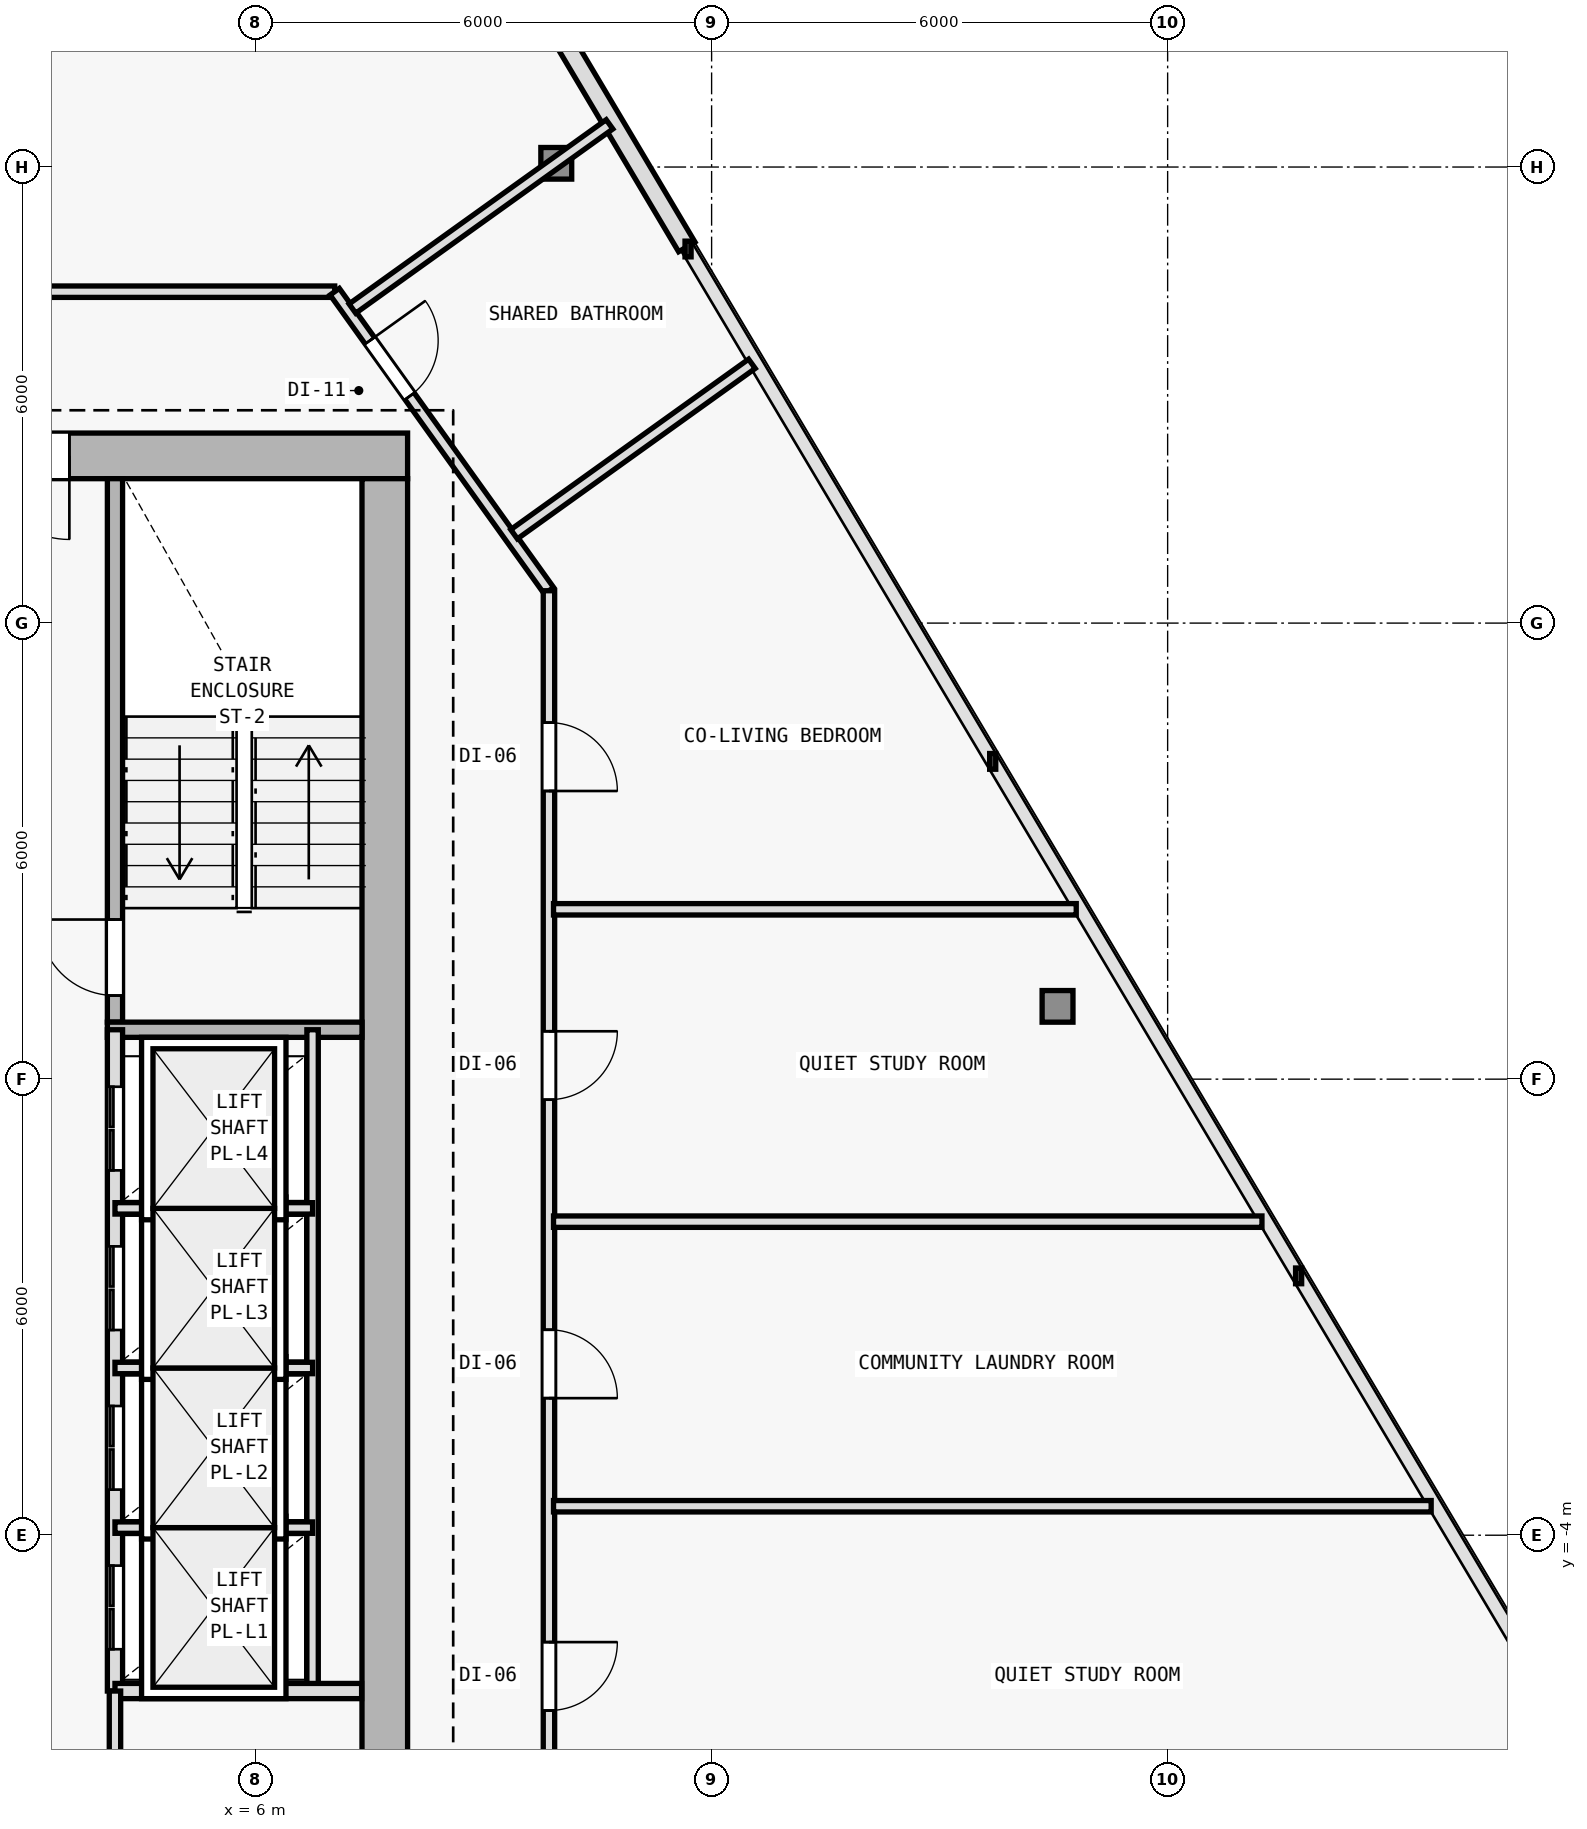
"""IFC4 building model, lengths in metres.
Left out: names, types, materials, properties, quantities, classifications, styles, units other than length and angle.
Written with IfcOpenShell. Run it as: python <this file> out.ifc"""

import sys

from ifc_helpers import new_model, si_unit, direction, frame, frame_2d, origin, origin_2d, place, context, subcontext, project, spatial, rectangle, i_section, extrude, element, fill, save


model = new_model("IFC4")
c1 = context("Model", 3, precision=1e-05, world=origin(), true_north=direction((0.0, 1.0)))
c2 = subcontext(c1, "Body", "Model", "MODEL_VIEW")
j1 = project(units=[si_unit("LENGTHUNIT", "METRE"), si_unit("PLANEANGLEUNIT", "RADIAN")], contexts=[c1])
p1 = place(None, origin())
s1 = spatial("IfcSite", under=j1, at=p1, CompositionType="ELEMENT")
p2 = place(p1, origin())
s2 = spatial("IfcBuilding", under=s1, at=p2, CompositionType="ELEMENT")
p3 = place(p2, frame((0.0, 0.0, 107.7)))
s3 = spatial("IfcBuildingStorey", under=s2, at=p3, CompositionType="ELEMENT", Elevation=107.7)
for number, where, z_axis, x_axis in (
    (1, (7.7, 10.2, 0.0), (0.0, 0.0, 1.0), (1.0, 0.0, 0.0)),
    (2, (7.7, 0.4, 0.0), (0.0, 0.0, 1.0), (1.0, 0.0, 0.0)),
):
    element("IfcColumn", number, at=place(p3, frame(where, z_axis=z_axis, x_axis=x_axis)), inside=s3, PredefinedType="COLUMN", context=c2, shape_type="SweptSolid", body=[
        extrude(i_section(OverallWidth=0.409, OverallDepth=0.425, WebThickness=0.021, FlangeThickness=0.034, FilletRadius=0.015, at=origin_2d()), origin(), (0.0, 0.0, 1.0), 3.6),
    ])
p4 = place(p3, frame((16.552, 2.958, 0.006), z_axis=(-0.019451168192, 0.009793595174, 0.999762840652), x_axis=(-0.449710241045, -0.893174506521, 0.0)))
e3 = element("IfcColumn", 3, at=p4, inside=s3, PredefinedType="COLUMN", context=c2, shape_type="SweptSolid", body=[
    extrude(i_section(OverallWidth=0.406, OverallDepth=0.416, WebThickness=0.019, FlangeThickness=0.031, FilletRadius=0.015, at=origin_2d()), origin(), (0.0, 0.0, 1.0), 3.59),
])
p5 = place(p3, frame((9.956, 14.049, 0.006), z_axis=(-0.012039903353, -0.002584838008, 0.999924176795), x_axis=(0.209906311695, -0.977721504474, 0.0)))
e4 = element("IfcColumn", 4, at=p5, inside=s3, PredefinedType="COLUMN", context=c2, shape_type="SweptSolid", body=[
    extrude(i_section(OverallWidth=0.406, OverallDepth=0.416, WebThickness=0.019, FlangeThickness=0.031, FilletRadius=0.015, at=origin_2d()), origin(), (0.0, 0.0, 1.0), 3.589),
])
p6 = place(p3, frame((6.017, 22.462, 0.0), z_axis=(0.0, 0.0, 1.0), x_axis=(0.511085523564, -0.859529864288, 0.0)))
e5 = element("IfcWall", 5, at=p6, inside=s3, PredefinedType="SOLIDWALL", context=c2, shape_type="SweptSolid", body=[
    extrude(rectangle(XDim=11.068, YDim=0.25, at=frame_2d((5.534, 0.0))), origin(), (0.0, 0.0, 1.0), 3.35),
])
p7 = place(p6, frame((4.934, 0.0, 0.62)))
e6 = element("IfcOpeningElement", 6, at=p7, cuts=e5, PredefinedType="OPENING", context=c2, shape_type="SweptSolid", body=[
    extrude(rectangle(XDim=1.2, YDim=1.8, at=frame_2d((0.6, 0.9))), frame((0.0, 0.135, 0.0), z_axis=(0.0, -1.0, 0.0), x_axis=(1.0, 0.0, 0.0)), (0.0, 0.0, 1.0), 0.27),
])
p8 = place(p3, frame((8.0, 10.2, 0.0), z_axis=(0.0, 0.0, 1.0), x_axis=(-1.0, 0.0, 0.0)))
e7 = element("IfcWall", 7, at=p8, inside=s3, PredefinedType="SHEAR", context=c2, shape_type="SweptSolid", body=[
    extrude(rectangle(XDim=16.0, YDim=0.6, at=frame_2d((8.0, 0.0))), origin(), (0.0, 0.0, 1.0), 3.35),
])
p9 = place(p8, frame((4.45, 0.0, 0.0)))
e8 = element("IfcOpeningElement", 8, at=p9, cuts=e7, PredefinedType="OPENING", context=c2, shape_type="SweptSolid", body=[
    extrude(rectangle(XDim=1.1, YDim=2.15, at=frame_2d((0.55, 1.075))), frame((0.0, 0.31, 0.0), z_axis=(0.0, -1.0, 0.0), x_axis=(1.0, 0.0, 0.0)), (0.0, 0.0, 1.0), 0.62),
])
p10 = place(p3, frame((7.7, 9.9, 0.0), z_axis=(0.0, 0.0, 1.0), x_axis=(0.0, -1.0, 0.0)))
e9 = element("IfcWall", 9, at=p10, inside=s3, PredefinedType="SHEAR", context=c2, shape_type="SweptSolid", body=[
    extrude(rectangle(XDim=19.0, YDim=0.6, at=frame_2d((9.5, 0.0))), origin(), (0.0, 0.0, 1.0), 3.35),
])
p11 = place(p3, frame((4.15, 2.75, 0.0), z_axis=(0.0, 0.0, 1.0), x_axis=(0.0, 1.0, 0.0)))
e10 = element("IfcWall", 10, at=p11, inside=s3, PredefinedType="SOLIDWALL", context=c2, shape_type="SweptSolid", body=[
    extrude(rectangle(XDim=7.15, YDim=0.2, at=frame_2d((3.575, 0.0))), origin(), (0.0, 0.0, 1.0), 3.35),
])
p12 = place(p11, frame((0.35, 0.0, 0.0)))
e11 = element("IfcOpeningElement", 11, at=p12, cuts=e10, PredefinedType="OPENING", context=c2, shape_type="SweptSolid", body=[
    extrude(rectangle(XDim=1.0, YDim=2.15, at=frame_2d((0.5, 1.075))), frame((0.0, 0.11, 0.0), z_axis=(0.0, -1.0, 0.0), x_axis=(1.0, 0.0, 0.0)), (0.0, 0.0, 1.0), 0.22),
])
p13 = place(p3, frame((4.05, 2.65, 0.0), z_axis=(0.0, 0.0, 1.0), x_axis=(1.0, 0.0, 0.0)))
e12 = element("IfcWall", 12, at=p13, inside=s3, PredefinedType="SOLIDWALL", context=c2, shape_type="SweptSolid", body=[
    extrude(rectangle(XDim=3.35, YDim=0.2, at=frame_2d((1.675, 0.0))), origin(), (0.0, 0.0, 1.0), 3.35),
])
p14 = place(p3, frame((4.15, -6.05, 0.0), z_axis=(0.0, 0.0, 1.0), x_axis=(0.0, 1.0, 0.0)))
e13 = element("IfcWall", 13, at=p14, inside=s3, PredefinedType="SOLIDWALL", context=c2, shape_type="SweptSolid", body=[
    extrude(rectangle(XDim=8.7, YDim=0.2, at=frame_2d((4.35, 0.0))), origin(), (0.0, 0.0, 1.0), 3.35),
])
p15 = place(p14, frame((0.55, 0.0, 0.0)))
e14 = element("IfcOpeningElement", 14, at=p15, cuts=e13, PredefinedType="OPENING", context=c2, shape_type="SweptSolid", body=[
    extrude(rectangle(XDim=1.1, YDim=2.15, at=frame_2d((0.55, 1.075))), frame((0.0, 0.11, 0.0), z_axis=(0.0, -1.0, 0.0), x_axis=(1.0, 0.0, 0.0)), (0.0, 0.0, 1.0), 0.22),
])
p16 = place(p14, frame((2.65, 0.0, 0.0)))
e15 = element("IfcOpeningElement", 15, at=p16, cuts=e13, PredefinedType="OPENING", context=c2, shape_type="SweptSolid", body=[
    extrude(rectangle(XDim=1.1, YDim=2.15, at=frame_2d((0.55, 1.075))), frame((0.0, 0.11, 0.0), z_axis=(0.0, -1.0, 0.0), x_axis=(1.0, 0.0, 0.0)), (0.0, 0.0, 1.0), 0.22),
])
p17 = place(p14, frame((4.75, 0.0, 0.0)))
e16 = element("IfcOpeningElement", 16, at=p17, cuts=e13, PredefinedType="OPENING", context=c2, shape_type="SweptSolid", body=[
    extrude(rectangle(XDim=1.1, YDim=2.15, at=frame_2d((0.55, 1.075))), frame((0.0, 0.11, 0.0), z_axis=(0.0, -1.0, 0.0), x_axis=(1.0, 0.0, 0.0)), (0.0, 0.0, 1.0), 0.22),
])
p18 = place(p14, frame((6.85, 0.0, 0.0)))
e17 = element("IfcOpeningElement", 17, at=p18, cuts=e13, PredefinedType="OPENING", context=c2, shape_type="SweptSolid", body=[
    extrude(rectangle(XDim=1.1, YDim=2.15, at=frame_2d((0.55, 1.075))), frame((0.0, 0.11, 0.0), z_axis=(0.0, -1.0, 0.0), x_axis=(1.0, 0.0, 0.0)), (0.0, 0.0, 1.0), 0.22),
])
p19 = place(p3, frame((6.75, -6.05, 0.0), z_axis=(0.0, 0.0, 1.0), x_axis=(0.0, 1.0, 0.0)))
e18 = element("IfcWall", 18, at=p19, inside=s3, PredefinedType="PARTITIONING", context=c2, shape_type="SweptSolid", body=[
    extrude(rectangle(XDim=8.7, YDim=0.15, at=frame_2d((4.35, 0.0))), origin(), (0.0, 0.0, 1.0), 3.35),
])
for number, where, z_axis, x_axis in (
    (19, (4.15, -3.9, 0.0), (0.0, 0.0, 1.0), (1.0, 0.0, 0.0)),
    (20, (4.15, -1.8, 0.0), (0.0, 0.0, 1.0), (1.0, 0.0, 0.0)),
    (21, (4.15, 0.3, 0.0), (0.0, 0.0, 1.0), (1.0, 0.0, 0.0)),
):
    element("IfcWall", number, at=place(p3, frame(where, z_axis=z_axis, x_axis=x_axis)), inside=s3, PredefinedType="PARTITIONING", context=c2, shape_type="SweptSolid", body=[
        extrude(rectangle(XDim=2.6, YDim=0.15, at=frame_2d((1.3, 0.0))), origin(), (0.0, 0.0, 1.0), 3.35),
    ])
p20 = place(p3, frame((4.15, -6.05, 0.0), z_axis=(0.0, 0.0, 1.0), x_axis=(1.0, 0.0, 0.0)))
e22 = element("IfcWall", 22, at=p20, inside=s3, PredefinedType="SOLIDWALL", context=c2, shape_type="SweptSolid", body=[
    extrude(rectangle(XDim=3.245, YDim=0.2, at=frame_2d((1.623, 0.0))), origin(), (0.0, 0.0, 1.0), 3.35),
])
p21 = place(p3, frame((4.15, -9.095, 0.0), z_axis=(0.0, 0.0, 1.0), x_axis=(0.0, 1.0, 0.0)))
e23 = element("IfcWall", 23, at=p21, inside=s3, PredefinedType="PARTITIONING", context=c2, shape_type="SweptSolid", body=[
    extrude(rectangle(XDim=3.045, YDim=0.15, at=frame_2d((1.522, 0.0))), origin(), (0.0, 0.0, 1.0), 3.35),
])
p22 = place(p21, frame((0.845, 0.0, 0.0)))
e24 = element("IfcOpeningElement", 24, at=p22, cuts=e23, PredefinedType="OPENING", context=c2, shape_type="SweptSolid", body=[
    extrude(rectangle(XDim=0.9, YDim=2.1, at=frame_2d((0.45, 1.05))), frame((0.0, 0.085, 0.0), z_axis=(0.0, -1.0, 0.0), x_axis=(1.0, 0.0, 0.0)), (0.0, 0.0, 1.0), 0.17),
])
p23 = place(p3, frame((-7.041, 12.36, 0.0), z_axis=(0.0, 0.0, 1.0), x_axis=(1.0, 0.0, 0.0)))
e25 = element("IfcWall", 25, at=p23, inside=s3, PredefinedType="PARTITIONING", context=c2, shape_type="SweptSolid", body=[
    extrude(rectangle(XDim=14.082, YDim=0.15, at=frame_2d((7.041, 0.0))), origin(), (0.0, 0.0, 1.0), 3.35),
])
p24 = place(p23, frame((6.591, 0.0, 0.0)))
e26 = element("IfcOpeningElement", 26, at=p24, cuts=e25, PredefinedType="OPENING", context=c2, shape_type="SweptSolid", body=[
    extrude(rectangle(XDim=0.9, YDim=2.1, at=frame_2d((0.45, 1.05))), frame((0.0, 0.085, 0.0), z_axis=(0.0, -1.0, 0.0), x_axis=(1.0, 0.0, 0.0)), (0.0, 0.0, 1.0), 0.17),
])
p25 = place(p3, frame((7.041, 12.36, 0.0), z_axis=(0.0, 0.0, 1.0), x_axis=(0.582449511476, -0.812866881218, 0.0)))
e27 = element("IfcWall", 27, at=p25, inside=s3, PredefinedType="PARTITIONING", context=c2, shape_type="SweptSolid", body=[
    extrude(rectangle(XDim=4.84, YDim=0.15, at=frame_2d((2.42, 0.0))), origin(), (0.0, 0.0, 1.0), 2.965),
])
p26 = place(p25, frame((0.792, 0.0, 0.0)))
e28 = element("IfcOpeningElement", 28, at=p26, cuts=e27, PredefinedType="OPENING", context=c2, shape_type="SweptSolid", body=[
    extrude(rectangle(XDim=0.9, YDim=2.1, at=frame_2d((0.45, 1.05))), frame((0.0, 0.085, 0.0), z_axis=(0.0, -1.0, 0.0), x_axis=(1.0, 0.0, 0.0)), (0.0, 0.0, 1.0), 0.17),
])
p27 = place(p3, frame((9.86, 8.426, 0.0), z_axis=(0.0, 0.0, 1.0), x_axis=(0.0, -1.0, 0.0)))
e29 = element("IfcWall", 29, at=p27, inside=s3, PredefinedType="PARTITIONING", context=c2, shape_type="SweptSolid", body=[
    extrude(rectangle(XDim=19.986, YDim=0.15, at=frame_2d((9.993, 0.0))), origin(), (0.0, 0.0, 1.0), 2.705),
])
p28 = place(p27, frame((17.713, 0.0, 0.0)))
e30 = element("IfcOpeningElement", 30, at=p28, cuts=e29, PredefinedType="OPENING", context=c2, shape_type="SweptSolid", body=[
    extrude(rectangle(XDim=0.9, YDim=2.1, at=frame_2d((0.45, 1.05))), frame((0.0, 0.085, 0.0), z_axis=(0.0, -1.0, 0.0), x_axis=(1.0, 0.0, 0.0)), (0.0, 0.0, 1.0), 0.17),
])
p29 = place(p27, frame((13.832, 0.0, 0.0)))
e31 = element("IfcOpeningElement", 31, at=p29, cuts=e29, PredefinedType="OPENING", context=c2, shape_type="SweptSolid", body=[
    extrude(rectangle(XDim=0.9, YDim=2.1, at=frame_2d((0.45, 1.05))), frame((0.0, 0.085, 0.0), z_axis=(0.0, -1.0, 0.0), x_axis=(1.0, 0.0, 0.0)), (0.0, 0.0, 1.0), 0.17),
])
p30 = place(p27, frame((9.722, 0.0, 0.0)))
e32 = element("IfcOpeningElement", 32, at=p30, cuts=e29, PredefinedType="OPENING", context=c2, shape_type="SweptSolid", body=[
    extrude(rectangle(XDim=0.9, YDim=2.1, at=frame_2d((0.45, 1.05))), frame((0.0, 0.085, 0.0), z_axis=(0.0, -1.0, 0.0), x_axis=(1.0, 0.0, 0.0)), (0.0, 0.0, 1.0), 0.17),
])
p31 = place(p27, frame((5.796, 0.0, 0.0)))
e33 = element("IfcOpeningElement", 33, at=p31, cuts=e29, PredefinedType="OPENING", context=c2, shape_type="SweptSolid", body=[
    extrude(rectangle(XDim=0.9, YDim=2.1, at=frame_2d((0.45, 1.05))), frame((0.0, 0.085, 0.0), z_axis=(0.0, -1.0, 0.0), x_axis=(1.0, 0.0, 0.0)), (0.0, 0.0, 1.0), 0.17),
])
p32 = place(p27, frame((1.735, 0.0, 0.0)))
e34 = element("IfcOpeningElement", 34, at=p32, cuts=e29, PredefinedType="OPENING", context=c2, shape_type="SweptSolid", body=[
    extrude(rectangle(XDim=0.9, YDim=2.1, at=frame_2d((0.45, 1.05))), frame((0.0, 0.085, 0.0), z_axis=(0.0, -1.0, 0.0), x_axis=(1.0, 0.0, 0.0)), (0.0, 0.0, 1.0), 0.17),
])
p33 = place(p3, frame((7.274, 12.138, 0.0), z_axis=(0.0, 0.0, 1.0), x_axis=(0.81287638154, 0.582436252593, 0.0)))
e35 = element("IfcWall", 35, at=p33, inside=s3, PredefinedType="PARTITIONING", context=c2, shape_type="SweptSolid", body=[
    extrude(rectangle(XDim=4.162, YDim=0.15, at=frame_2d((2.081, 0.0))), origin(), (0.0, 0.0, 1.0), 2.835),
])
p34 = place(p3, frame((9.92, 0.125, 0.0), z_axis=(0.0, 0.0, 1.0), x_axis=(1.0, 0.0, 0.0)))
e36 = element("IfcWall", 36, at=p34, inside=s3, PredefinedType="PARTITIONING", context=c2, shape_type="SweptSolid", body=[
    extrude(rectangle(XDim=9.321, YDim=0.15, at=frame_2d((4.661, 0.0))), origin(), (0.0, 0.0, 1.0), 2.725),
])
p35 = place(p3, frame((9.92, -3.619, 0.0), z_axis=(0.0, 0.0, 1.0), x_axis=(1.0, 0.0, 0.0)))
e37 = element("IfcWall", 37, at=p35, inside=s3, PredefinedType="PARTITIONING", context=c2, shape_type="SweptSolid", body=[
    extrude(rectangle(XDim=11.547, YDim=0.15, at=frame_2d((5.774, 0.0))), origin(), (0.0, 0.0, 1.0), 2.725),
])
p36 = place(p3, frame((9.92, 4.235, 0.0), z_axis=(0.0, 0.0, 1.0), x_axis=(1.0, 0.0, 0.0)))
e38 = element("IfcWall", 38, at=p36, inside=s3, PredefinedType="PARTITIONING", context=c2, shape_type="SweptSolid", body=[
    extrude(rectangle(XDim=6.877, YDim=0.15, at=frame_2d((3.439, 0.0))), origin(), (0.0, 0.0, 1.0), 2.835),
])
p37 = place(p3, frame((9.401, 9.169, 0.0), z_axis=(0.0, 0.0, 1.0), x_axis=(0.812892695259, 0.582413483699, 0.0)))
e39 = element("IfcWall", 39, at=p37, inside=s3, PredefinedType="PARTITIONING", context=c2, shape_type="SweptSolid", body=[
    extrude(rectangle(XDim=3.849, YDim=0.15, at=frame_2d((1.925, 0.0))), origin(), (0.0, 0.0, 1.0), 2.835),
])
p38 = place(p9, origin())
e40 = element("IfcDoor", 40, at=p38, inside=s3, OperationType="SINGLE_SWING_LEFT", PredefinedType="DOOR", context=c2, shape_type="SweptSolid", body=[
    extrude(rectangle(XDim=1.1, YDim=2.15, at=frame_2d((0.55, 1.075))), frame((0.0, 0.025, 0.0), z_axis=(0.0, -1.0, 0.0), x_axis=(1.0, 0.0, 0.0)), (0.0, 0.0, 1.0), 0.05),
])
fill(e8, e40)
p39 = place(p12, origin())
e41 = element("IfcDoor", 41, at=p39, inside=s3, OperationType="SINGLE_SWING_RIGHT", PredefinedType="DOOR", context=c2, shape_type="SweptSolid", body=[
    extrude(rectangle(XDim=1.0, YDim=2.15, at=frame_2d((0.5, 1.075))), frame((0.0, 0.025, 0.0), z_axis=(0.0, -1.0, 0.0), x_axis=(1.0, 0.0, 0.0)), (0.0, 0.0, 1.0), 0.05),
])
fill(e11, e41)
p40 = place(p15, origin())
e42 = element("IfcDoor", 42, at=p40, inside=s3, OperationType="DOUBLE_DOOR_SLIDING", PredefinedType="DOOR", context=c2, shape_type="SweptSolid", body=[
    extrude(rectangle(XDim=1.1, YDim=2.15, at=frame_2d((0.55, 1.075))), frame((0.0, 0.025, 0.0), z_axis=(0.0, -1.0, 0.0), x_axis=(1.0, 0.0, 0.0)), (0.0, 0.0, 1.0), 0.05),
])
fill(e14, e42)
p41 = place(p16, origin())
e43 = element("IfcDoor", 43, at=p41, inside=s3, OperationType="DOUBLE_DOOR_SLIDING", PredefinedType="DOOR", context=c2, shape_type="SweptSolid", body=[
    extrude(rectangle(XDim=1.1, YDim=2.15, at=frame_2d((0.55, 1.075))), frame((0.0, 0.025, 0.0), z_axis=(0.0, -1.0, 0.0), x_axis=(1.0, 0.0, 0.0)), (0.0, 0.0, 1.0), 0.05),
])
fill(e15, e43)
p42 = place(p17, origin())
e44 = element("IfcDoor", 44, at=p42, inside=s3, OperationType="DOUBLE_DOOR_SLIDING", PredefinedType="DOOR", context=c2, shape_type="SweptSolid", body=[
    extrude(rectangle(XDim=1.1, YDim=2.15, at=frame_2d((0.55, 1.075))), frame((0.0, 0.025, 0.0), z_axis=(0.0, -1.0, 0.0), x_axis=(1.0, 0.0, 0.0)), (0.0, 0.0, 1.0), 0.05),
])
fill(e16, e44)
p43 = place(p18, origin())
e45 = element("IfcDoor", 45, at=p43, inside=s3, OperationType="DOUBLE_DOOR_SLIDING", PredefinedType="DOOR", context=c2, shape_type="SweptSolid", body=[
    extrude(rectangle(XDim=1.1, YDim=2.15, at=frame_2d((0.55, 1.075))), frame((0.0, 0.025, 0.0), z_axis=(0.0, -1.0, 0.0), x_axis=(1.0, 0.0, 0.0)), (0.0, 0.0, 1.0), 0.05),
])
fill(e17, e45)
p44 = place(p29, origin())
e46 = element("IfcDoor", 46, at=p44, inside=s3, OperationType="SINGLE_SWING_LEFT", PredefinedType="DOOR", context=c2, shape_type="SweptSolid", body=[
    extrude(rectangle(XDim=0.9, YDim=2.1, at=frame_2d((0.45, 1.05))), frame((0.0, 0.025, 0.0), z_axis=(0.0, -1.0, 0.0), x_axis=(1.0, 0.0, 0.0)), (0.0, 0.0, 1.0), 0.05),
])
fill(e31, e46)
p45 = place(p30, origin())
e47 = element("IfcDoor", 47, at=p45, inside=s3, OperationType="SINGLE_SWING_RIGHT", PredefinedType="DOOR", context=c2, shape_type="SweptSolid", body=[
    extrude(rectangle(XDim=0.9, YDim=2.1, at=frame_2d((0.45, 1.05))), frame((0.0, 0.025, 0.0), z_axis=(0.0, -1.0, 0.0), x_axis=(1.0, 0.0, 0.0)), (0.0, 0.0, 1.0), 0.05),
])
fill(e32, e47)
p46 = place(p31, origin())
e48 = element("IfcDoor", 48, at=p46, inside=s3, OperationType="SINGLE_SWING_LEFT", PredefinedType="DOOR", context=c2, shape_type="SweptSolid", body=[
    extrude(rectangle(XDim=0.9, YDim=2.1, at=frame_2d((0.45, 1.05))), frame((0.0, 0.025, 0.0), z_axis=(0.0, -1.0, 0.0), x_axis=(1.0, 0.0, 0.0)), (0.0, 0.0, 1.0), 0.05),
])
fill(e33, e48)
p47 = place(p32, origin())
e49 = element("IfcDoor", 49, at=p47, inside=s3, OperationType="SINGLE_SWING_RIGHT", PredefinedType="DOOR", context=c2, shape_type="SweptSolid", body=[
    extrude(rectangle(XDim=0.9, YDim=2.1, at=frame_2d((0.45, 1.05))), frame((0.0, 0.025, 0.0), z_axis=(0.0, -1.0, 0.0), x_axis=(1.0, 0.0, 0.0)), (0.0, 0.0, 1.0), 0.05),
])
fill(e34, e49)
p48 = place(p26, origin())
e50 = element("IfcDoor", 50, at=p48, inside=s3, OperationType="SINGLE_SWING_LEFT", PredefinedType="DOOR", context=c2, shape_type="SweptSolid", body=[
    extrude(rectangle(XDim=0.9, YDim=2.1, at=frame_2d((0.45, 1.05))), frame((0.0, 0.025, 0.0), z_axis=(0.0, -1.0, 0.0), x_axis=(1.0, 0.0, 0.0)), (0.0, 0.0, 1.0), 0.05),
])
fill(e28, e50)
save(model, sys.argv[1])
